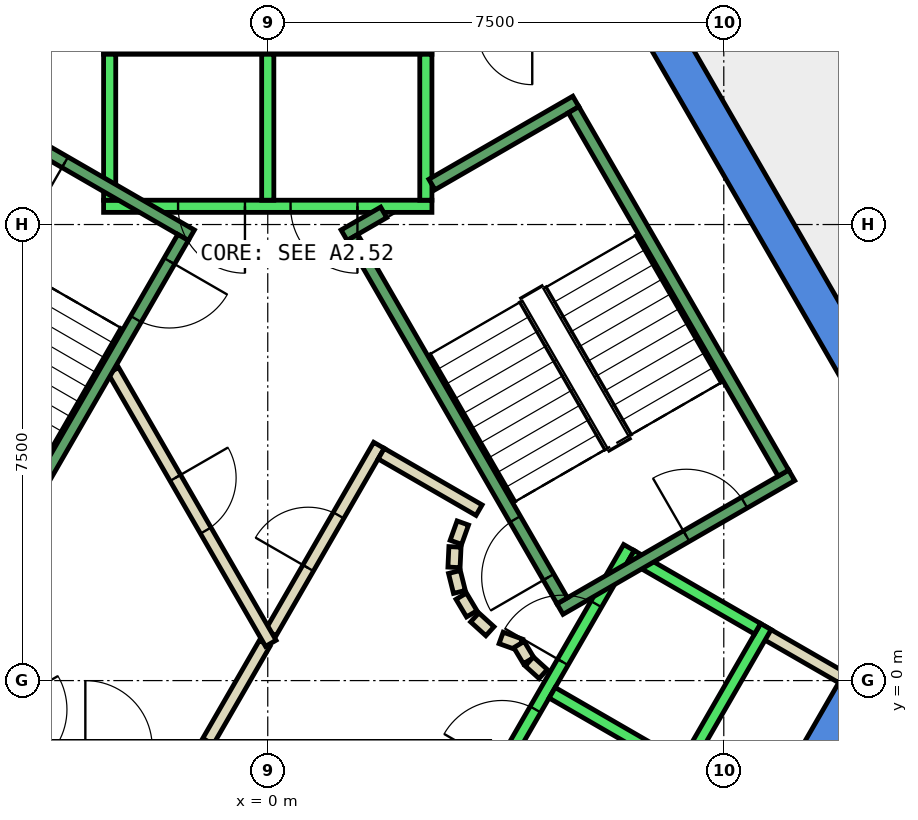
"""IFC4 building model, lengths in metres.
Left out: names, types, materials, properties, quantities, classifications, styles, units other than length and angle.
Written with IfcOpenShell. Run it as: python <this file> out.ifc"""

import sys

from ifc_helpers import new_model, si_unit, direction, frame, frame_2d, origin, place, context, subcontext, project, spatial, polyline, rectangle, outline, extrude, element, fill, save


model = new_model("IFC4")
c1 = context("Model", 3, precision=1e-05, world=origin(), true_north=direction((0.0, 1.0)))
c2 = subcontext(c1, "Body", "Model", "MODEL_VIEW")
j1 = project(units=[si_unit("LENGTHUNIT", "METRE"), si_unit("PLANEANGLEUNIT", "RADIAN")], contexts=[c1])
p1 = place(None, origin())
s1 = spatial("IfcSite", under=j1, at=p1, CompositionType="ELEMENT")
p2 = place(p1, origin())
s2 = spatial("IfcBuilding", under=s1, at=p2, CompositionType="ELEMENT")
p3 = place(p2, frame((0.0, 0.0, 252.2)))
s3 = spatial("IfcBuildingStorey", under=s2, at=p3, CompositionType="ELEMENT", Elevation=252.2)
p4 = place(p3, frame((0.0, 0.0, -0.34)))
e1 = element("IfcWall", 1, at=p4, inside=s3, PredefinedType="SHEAR", context=c2, shape_type="SweptSolid", body=[
    extrude(outline(polyline([(6.786, 10.747), (6.266, 10.447), (10.854, 2.5), (11.547, 2.5), (6.786, 10.747)])), origin(), (0.0, 0.0, 1.0), 3.6),
])
p5 = place(p3, frame((0.0, 0.0, -0.34)))
e2 = element("IfcWall", 2, at=p5, inside=s3, PredefinedType="SHEAR", context=c2, shape_type="SweptSolid", body=[
    extrude(outline(polyline([(5.774, -7.5), (11.547, 2.5), (10.854, 2.5), (5.427, -6.9), (5.774, -7.5)])), origin(), (0.0, 0.0, 1.0), 3.6),
])
p6 = place(p3, frame((8.181, 13.532, 0.0), z_axis=(0.0, 0.0, 1.0), x_axis=(0.51625987265, -0.856431984393, 0.0)))
e3 = element("IfcWall", 3, at=p6, inside=s3, PredefinedType="PARTITIONING", context=c2, shape_type="SweptSolid", body=[
    extrude(rectangle(XDim=4.312, YDim=0.2, at=frame_2d((2.156, 0.0))), origin(), (0.0, 0.0, 1.0), 3.26),
])
p7 = place(p6, frame((1.706, 0.0, 0.0)))
e4 = element("IfcOpeningElement", 4, at=p7, cuts=e3, PredefinedType="OPENING", context=c2, shape_type="SweptSolid", body=[
    extrude(rectangle(XDim=1.0, YDim=2.1, at=frame_2d((0.5, 1.05))), frame((0.0, 0.11, 0.0), z_axis=(0.0, -1.0, 0.0), x_axis=(1.0, 0.0, 0.0)), (0.0, 0.0, 1.0), 0.22),
])
p8 = place(p3, frame((8.141, 0.801, 0.0), z_axis=(0.0, 0.0, 1.0), x_axis=(0.866434738017, -0.499290341141, 0.0)))
e5 = element("IfcWall", 5, at=p8, inside=s3, PredefinedType="PARTITIONING", context=c2, shape_type="SweptSolid", body=[
    extrude(rectangle(XDim=1.5, YDim=0.2, at=frame_2d((0.75, 0.0))), origin(), (0.0, 0.0, 1.0), 3.26),
])
p9 = place(p3, frame((9.285, -4.818, 0.0), z_axis=(0.0, 0.0, 1.0), x_axis=(0.499962569651, 0.866047013128, 0.0)))
e6 = element("IfcWall", 6, at=p9, inside=s3, PredefinedType="PARTITIONING", context=c2, shape_type="SweptSolid", body=[
    extrude(rectangle(XDim=7.334, YDim=0.2, at=frame_2d((3.667, 0.0))), origin(), (0.0, 0.0, 1.0), 3.26),
])
p10 = place(p3, frame((-0.982, -1.0, 0.0), z_axis=(0.0, 0.0, 1.0), x_axis=(0.50024047865, 0.865886518847, 0.0)))
e7 = element("IfcWall", 7, at=p10, inside=s3, PredefinedType="PARTITIONING", context=c2, shape_type="SweptSolid", body=[
    extrude(rectangle(XDim=1.863, YDim=0.2, at=frame_2d((0.931, 0.0))), origin(), (0.0, 0.0, 1.0), 3.26),
])
p11 = place(p3, frame((0.05, 0.787, 0.0), z_axis=(0.0, 0.0, 1.0), x_axis=(0.499954076797, 0.866051915934, 0.0)))
e8 = element("IfcWall", 8, at=p11, inside=s3, PredefinedType="PARTITIONING", context=c2, shape_type="SweptSolid", body=[
    extrude(rectangle(XDim=3.558, YDim=0.2, at=frame_2d((1.779, 0.0))), origin(), (0.0, 0.0, 1.0), 3.26),
])
p12 = place(p11, frame((1.229, 0.0, 0.0)))
e9 = element("IfcOpeningElement", 9, at=p12, cuts=e8, PredefinedType="OPENING", context=c2, shape_type="SweptSolid", body=[
    extrude(rectangle(XDim=1.0, YDim=2.1, at=frame_2d((0.5, 1.05))), frame((0.0, 0.11, 0.0), z_axis=(0.0, -1.0, 0.0), x_axis=(1.0, 0.0, 0.0)), (0.0, 0.0, 1.0), 0.22),
])
p13 = place(p3, frame((1.866, 3.732, 0.0), z_axis=(0.0, 0.0, 1.0), x_axis=(0.866043361281, -0.499968895414, 0.0)))
e10 = element("IfcWall", 10, at=p13, inside=s3, PredefinedType="PARTITIONING", context=c2, shape_type="SweptSolid", body=[
    extrude(rectangle(XDim=1.858, YDim=0.2, at=frame_2d((0.929, 0.0))), origin(), (0.0, 0.0, 1.0), 3.26),
])
p14 = place(p3, frame((3.208, 2.592, 0.0), z_axis=(0.0, 0.0, 1.0), x_axis=(-0.337388820924, -0.941365382578, 0.0)))
e11 = element("IfcWall", 11, at=p14, inside=s3, PredefinedType="PARTITIONING", context=c2, shape_type="SweptSolid", body=[
    extrude(rectangle(XDim=0.338, YDim=0.2, at=frame_2d((0.169, 0.0))), origin(), (0.0, 0.0, 1.0), 3.26),
])
p15 = place(p3, frame((3.079, 2.199, 0.0), z_axis=(0.0, 0.0, 1.0), x_axis=(-0.047771483479, -0.998858290933, 0.0)))
e12 = element("IfcWall", 12, at=p15, inside=s3, PredefinedType="PARTITIONING", context=c2, shape_type="SweptSolid", body=[
    extrude(rectangle(XDim=0.337, YDim=0.2, at=frame_2d((0.169, 0.0))), origin(), (0.0, 0.0, 1.0), 3.26),
])
p16 = place(p3, frame((3.07, 1.786, 0.0), z_axis=(0.0, 0.0, 1.0), x_axis=(0.242705583207, -0.970099994784, 0.0)))
e13 = element("IfcWall", 13, at=p16, inside=s3, PredefinedType="PARTITIONING", context=c2, shape_type="SweptSolid", body=[
    extrude(rectangle(XDim=0.338, YDim=0.2, at=frame_2d((0.169, 0.0))), origin(), (0.0, 0.0, 1.0), 3.26),
])
for number, where, z_axis, x_axis in (
    (14, (3.182, 1.388, 0.0), (0.0, 0.0, 1.0), (0.512, -0.859, 0.0)),
    (15, (3.404, 1.039, 0.0), (0.0, 0.0, 1.0), (0.74, -0.672, 0.0)),
):
    element("IfcWall", number, at=place(p3, frame(where, z_axis=z_axis, x_axis=x_axis)), inside=s3, PredefinedType="PARTITIONING", context=c2, shape_type="SweptSolid", body=[
        extrude(rectangle(XDim=0.338, YDim=0.2, at=frame_2d((0.169, 0.0))), origin(), (0.0, 0.0, 1.0), 3.26),
    ])
p17 = place(p3, frame((3.838, 0.702, 0.0), z_axis=(0.0, 0.0, 1.0), x_axis=(0.941035081519, -0.338308993895, 0.0)))
e16 = element("IfcWall", 16, at=p17, inside=s3, PredefinedType="PARTITIONING", context=c2, shape_type="SweptSolid", body=[
    extrude(rectangle(XDim=0.337, YDim=0.2, at=frame_2d((0.168, 0.0))), origin(), (0.0, 0.0, 1.0), 3.26),
])
p18 = place(p3, frame((4.132, 0.593, 0.0), z_axis=(0.0, 0.0, 1.0), x_axis=(0.513561617048, -0.858052717201, 0.0)))
e17 = element("IfcWall", 17, at=p18, inside=s3, PredefinedType="PARTITIONING", context=c2, shape_type="SweptSolid", body=[
    extrude(rectangle(XDim=0.308, YDim=0.2, at=frame_2d((0.154, 0.0))), origin(), (0.0, 0.0, 1.0), 3.26),
])
p19 = place(p3, frame((4.301, 0.315, 0.0), z_axis=(0.0, 0.0, 1.0), x_axis=(0.741798017506, -0.670623367639, 0.0)))
e18 = element("IfcWall", 18, at=p19, inside=s3, PredefinedType="PARTITIONING", context=c2, shape_type="SweptSolid", body=[
    extrude(rectangle(XDim=0.309, YDim=0.2, at=frame_2d((0.154, 0.0))), origin(), (0.0, 0.0, 1.0), 3.26),
])
p20 = place(p3, frame((-2.54, 5.1, 0.0), z_axis=(0.0, 0.0, 1.0), x_axis=(0.499925051871, -0.866068670783, 0.0)))
e19 = element("IfcWall", 19, at=p20, inside=s3, PredefinedType="PARTITIONING", context=c2, shape_type="SweptSolid", body=[
    extrude(rectangle(XDim=5.181, YDim=0.2, at=frame_2d((2.59, 0.0))), origin(), (0.0, 0.0, 1.0), 3.26),
])
p21 = place(p20, frame((2.04, 0.0, 0.0)))
e20 = element("IfcOpeningElement", 20, at=p21, cuts=e19, PredefinedType="OPENING", context=c2, shape_type="SweptSolid", body=[
    extrude(rectangle(XDim=1.0, YDim=2.1, at=frame_2d((0.5, 1.05))), frame((0.0, 0.11, 0.0), z_axis=(0.0, -1.0, 0.0), x_axis=(1.0, 0.0, 0.0)), (0.0, 0.0, 1.0), 0.22),
])
p22 = place(p3, frame((2.7, 7.8, 0.0), z_axis=(0.0, 0.0, 1.0), x_axis=(-1.0, 0.0, 0.0)))
e21 = element("IfcWall", 21, at=p22, inside=s3, PredefinedType="STANDARD", context=c2, shape_type="SweptSolid", body=[
    extrude(rectangle(XDim=5.4, YDim=0.2, at=frame_2d((2.7, 0.0))), origin(), (0.0, 0.0, 1.0), 3.26),
])
p23 = place(p22, frame((1.225, 0.0, 0.0)))
e22 = element("IfcOpeningElement", 22, at=p23, cuts=e21, PredefinedType="OPENING", context=c2, shape_type="SweptSolid", body=[
    extrude(rectangle(XDim=1.1, YDim=2.1, at=frame_2d((0.55, 1.05))), frame((0.0, 0.11, 0.0), z_axis=(0.0, -1.0, 0.0), x_axis=(1.0, 0.0, 0.0)), (0.0, 0.0, 1.0), 0.22),
])
p24 = place(p22, frame((3.075, 0.0, 0.0)))
e23 = element("IfcOpeningElement", 23, at=p24, cuts=e21, PredefinedType="OPENING", context=c2, shape_type="SweptSolid", body=[
    extrude(rectangle(XDim=1.1, YDim=2.1, at=frame_2d((0.55, 1.05))), frame((0.0, 0.11, 0.0), z_axis=(0.0, -1.0, 0.0), x_axis=(1.0, 0.0, 0.0)), (0.0, 0.0, 1.0), 0.22),
])
p25 = place(p3, frame((2.7, 10.4, 0.0), z_axis=(0.0, 0.0, 1.0), x_axis=(-1.0, 0.0, 0.0)))
e24 = element("IfcWall", 24, at=p25, inside=s3, PredefinedType="STANDARD", context=c2, shape_type="SweptSolid", body=[
    extrude(rectangle(XDim=5.4, YDim=0.2, at=frame_2d((2.7, 0.0))), origin(), (0.0, 0.0, 1.0), 3.26),
])
for number, where, z_axis, x_axis in (
    (25, (2.6, 7.9, 0.0), (0.0, 0.0, 1.0), (0.0, 1.0, 0.0)),
    (26, (0.0, 7.9, 0.0), (0.0, 0.0, 1.0), (0.0, 1.0, 0.0)),
    (27, (-2.6, 7.9, 0.0), (0.0, 0.0, 1.0), (0.0, 1.0, 0.0)),
):
    element("IfcWall", number, at=place(p3, frame(where, z_axis=z_axis, x_axis=x_axis)), inside=s3, PredefinedType="STANDARD", context=c2, shape_type="SweptSolid", body=[
        extrude(rectangle(XDim=2.4, YDim=0.2, at=frame_2d((1.2, 0.0))), origin(), (0.0, 0.0, 1.0), 3.26),
    ])
p26 = place(p3, frame((-5.94, 2.188, 0.0), z_axis=(0.0, 0.0, 1.0), x_axis=(0.500034260056, -0.866005622828, 0.0)))
e28 = element("IfcWall", 28, at=p26, inside=s3, PredefinedType="STANDARD", context=c2, shape_type="SweptSolid", body=[
    extrude(rectangle(XDim=5.399, YDim=0.2, at=frame_2d((2.7, 0.0))), origin(), (0.0, 0.0, 1.0), 3.26),
])
p27 = place(p26, frame((3.075, 0.0, 0.0)))
e29 = element("IfcOpeningElement", 29, at=p27, cuts=e28, PredefinedType="OPENING", context=c2, shape_type="SweptSolid", body=[
    extrude(rectangle(XDim=1.1, YDim=2.1, at=frame_2d((0.55, 1.05))), frame((0.0, 0.11, 0.0), z_axis=(0.0, -1.0, 0.0), x_axis=(1.0, 0.0, 0.0)), (0.0, 0.0, 1.0), 0.22),
])
p28 = place(p26, frame((1.225, 0.0, 0.0)))
e30 = element("IfcOpeningElement", 30, at=p28, cuts=e28, PredefinedType="OPENING", context=c2, shape_type="SweptSolid", body=[
    extrude(rectangle(XDim=1.1, YDim=2.1, at=frame_2d((0.55, 1.05))), frame((0.0, 0.11, 0.0), z_axis=(0.0, -1.0, 0.0), x_axis=(1.0, 0.0, 0.0)), (0.0, 0.0, 1.0), 0.22),
])
p29 = place(p3, frame((3.24, -2.488, 0.0), z_axis=(0.0, 0.0, 1.0), x_axis=(0.500034260056, 0.866005622828, 0.0)))
e31 = element("IfcWall", 31, at=p29, inside=s3, PredefinedType="STANDARD", context=c2, shape_type="SweptSolid", body=[
    extrude(rectangle(XDim=5.399, YDim=0.2, at=frame_2d((2.7, 0.0))), origin(), (0.0, 0.0, 1.0), 3.26),
])
p30 = place(p29, frame((3.225, 0.0, 0.0)))
e32 = element("IfcOpeningElement", 32, at=p30, cuts=e31, PredefinedType="OPENING", context=c2, shape_type="SweptSolid", body=[
    extrude(rectangle(XDim=1.1, YDim=2.1, at=frame_2d((0.55, 1.05))), frame((0.0, 0.11, 0.0), z_axis=(0.0, -1.0, 0.0), x_axis=(1.0, 0.0, 0.0)), (0.0, 0.0, 1.0), 0.22),
])
p31 = place(p29, frame((1.225, 0.0, 0.0)))
e33 = element("IfcOpeningElement", 33, at=p31, cuts=e31, PredefinedType="OPENING", context=c2, shape_type="SweptSolid", body=[
    extrude(rectangle(XDim=1.1, YDim=2.1, at=frame_2d((0.55, 1.05))), frame((0.0, 0.11, 0.0), z_axis=(0.0, -1.0, 0.0), x_axis=(1.0, 0.0, 0.0)), (0.0, 0.0, 1.0), 0.22),
])
p32 = place(p3, frame((5.492, -3.788, 0.0), z_axis=(0.0, 0.0, 1.0), x_axis=(0.500034260056, 0.866005622828, 0.0)))
e34 = element("IfcWall", 34, at=p32, inside=s3, PredefinedType="STANDARD", context=c2, shape_type="SweptSolid", body=[
    extrude(rectangle(XDim=5.399, YDim=0.2, at=frame_2d((2.7, 0.0))), origin(), (0.0, 0.0, 1.0), 3.26),
])
for number, where, z_axis, x_axis in (
    (35, (4.677, -0.2, 0.0), (0.0, 0.0, 1.0), (0.866, -0.5, 0.0)),
    (36, (5.977, 2.052, 0.0), (0.0, 0.0, 1.0), (0.866, -0.5, 0.0)),
):
    element("IfcWall", number, at=place(p3, frame(where, z_axis=z_axis, x_axis=x_axis)), inside=s3, PredefinedType="STANDARD", context=c2, shape_type="SweptSolid", body=[
        extrude(rectangle(XDim=2.399, YDim=0.2, at=frame_2d((1.2, 0.0))), origin(), (0.0, 0.0, 1.0), 3.26),
    ])
p33 = place(p3, frame((4.806, 1.176, 0.0), z_axis=(0.0, 0.0, 1.0), x_axis=(0.866059941101, 0.499940174841, 0.0)))
e37 = element("IfcWall", 37, at=p33, inside=s3, PredefinedType="STANDARD", context=c2, shape_type="SweptSolid", body=[
    extrude(rectangle(XDim=4.4, YDim=0.2, at=frame_2d((2.2, 0.0))), origin(), (0.0, 0.0, 1.0), 3.26),
])
p34 = place(p33, frame((2.4, 0.0, 0.0)))
e38 = element("IfcOpeningElement", 38, at=p34, cuts=e37, PredefinedType="OPENING", context=c2, shape_type="SweptSolid", body=[
    extrude(rectangle(XDim=1.1, YDim=2.2, at=frame_2d((0.55, 1.1))), frame((0.0, 0.11, 0.0), z_axis=(0.0, -1.0, 0.0), x_axis=(1.0, 0.0, 0.0)), (0.0, 0.0, 1.0), 0.22),
])
p35 = place(p3, frame((2.7, 8.158, 0.0), z_axis=(0.0, 0.0, 1.0), x_axis=(0.86611865017, 0.499838457731, 0.0)))
e39 = element("IfcWall", 39, at=p35, inside=s3, PredefinedType="STANDARD", context=c2, shape_type="SweptSolid", body=[
    extrude(rectangle(XDim=2.733, YDim=0.2, at=frame_2d((1.366, 0.0))), origin(), (0.0, 0.0, 1.0), 3.26),
])
p36 = place(p3, frame((1.256, 7.324, 0.0), z_axis=(0.0, 0.0, 1.0), x_axis=(0.865915093549, 0.500191014278, 0.0)))
e40 = element("IfcWall", 40, at=p36, inside=s3, PredefinedType="STANDARD", context=c2, shape_type="SweptSolid", body=[
    extrude(rectangle(XDim=0.752, YDim=0.2, at=frame_2d((0.376, 0.0))), origin(), (0.0, 0.0, 1.0), 3.26),
])
p37 = place(p3, frame((4.843, 1.312, 0.0), z_axis=(0.0, 0.0, 1.0), x_axis=(-0.499963383562, 0.866046543262, 0.0)))
e41 = element("IfcWall", 41, at=p37, inside=s3, PredefinedType="STANDARD", context=c2, shape_type="SweptSolid", body=[
    extrude(rectangle(XDim=6.9, YDim=0.2, at=frame_2d((3.45, 0.0))), origin(), (0.0, 0.0, 1.0), 3.26),
])
p38 = place(p37, frame((0.45, 0.0, 0.0)))
e42 = element("IfcOpeningElement", 42, at=p38, cuts=e41, PredefinedType="OPENING", context=c2, shape_type="SweptSolid", body=[
    extrude(rectangle(XDim=1.1, YDim=2.2, at=frame_2d((0.55, 1.1))), frame((0.0, 0.11, 0.0), z_axis=(0.0, -1.0, 0.0), x_axis=(1.0, 0.0, 0.0)), (0.0, 0.0, 1.0), 0.22),
])
p39 = place(p3, frame((8.48, 3.412, 0.0), z_axis=(0.0, 0.0, 1.0), x_axis=(-0.499978703459, 0.866037698999, 0.0)))
e43 = element("IfcWall", 43, at=p39, inside=s3, PredefinedType="STANDARD", context=c2, shape_type="SweptSolid", body=[
    extrude(rectangle(XDim=6.9, YDim=0.2, at=frame_2d((3.45, 0.0))), origin(), (0.0, 0.0, 1.0), 3.26),
])
p40 = place(p3, frame((-1.256, 7.324, 0.0), z_axis=(0.0, 0.0, 1.0), x_axis=(-0.866046073146, 0.499964197906, 0.0)))
e44 = element("IfcWall", 44, at=p40, inside=s3, PredefinedType="STANDARD", context=c2, shape_type="SweptSolid", body=[
    extrude(rectangle(XDim=4.4, YDim=0.2, at=frame_2d((2.2, 0.0))), origin(), (0.0, 0.0, 1.0), 3.26),
])
p41 = place(p40, frame((2.4, 0.0, 0.0)))
e45 = element("IfcOpeningElement", 45, at=p41, cuts=e44, PredefinedType="OPENING", context=c2, shape_type="SweptSolid", body=[
    extrude(rectangle(XDim=1.1, YDim=2.2, at=frame_2d((0.55, 1.1))), frame((0.0, 0.11, 0.0), z_axis=(0.0, -1.0, 0.0), x_axis=(1.0, 0.0, 0.0)), (0.0, 0.0, 1.0), 0.22),
])
p42 = place(p3, frame((-1.393, 7.288, 0.0), z_axis=(0.0, 0.0, 1.0), x_axis=(-0.499963383562, -0.866046543262, 0.0)))
e46 = element("IfcWall", 46, at=p42, inside=s3, PredefinedType="STANDARD", context=c2, shape_type="SweptSolid", body=[
    extrude(rectangle(XDim=6.9, YDim=0.2, at=frame_2d((3.45, 0.0))), origin(), (0.0, 0.0, 1.0), 3.26),
])
p43 = place(p42, frame((0.45, 0.0, 0.0)))
e47 = element("IfcOpeningElement", 47, at=p43, cuts=e46, PredefinedType="OPENING", context=c2, shape_type="SweptSolid", body=[
    extrude(rectangle(XDim=1.1, YDim=2.2, at=frame_2d((0.55, 1.1))), frame((0.0, 0.11, 0.0), z_axis=(0.0, -1.0, 0.0), x_axis=(1.0, 0.0, 0.0)), (0.0, 0.0, 1.0), 0.22),
])
p44 = place(p12, origin())
e48 = element("IfcDoor", 48, at=p44, inside=s3, OperationType="SINGLE_SWING_RIGHT", PredefinedType="DOOR", context=c2, shape_type="SweptSolid", body=[
    extrude(rectangle(XDim=1.0, YDim=2.1, at=frame_2d((0.5, 1.05))), frame((0.0, 0.025, 0.0), z_axis=(0.0, -1.0, 0.0), x_axis=(1.0, 0.0, 0.0)), (0.0, 0.0, 1.0), 0.05),
])
fill(e9, e48)
p45 = place(p21, origin())
e49 = element("IfcDoor", 49, at=p45, inside=s3, OperationType="SINGLE_SWING_RIGHT", PredefinedType="DOOR", context=c2, shape_type="SweptSolid", body=[
    extrude(rectangle(XDim=1.0, YDim=2.1, at=frame_2d((0.5, 1.05))), frame((0.0, 0.025, 0.0), z_axis=(0.0, -1.0, 0.0), x_axis=(1.0, 0.0, 0.0)), (0.0, 0.0, 1.0), 0.05),
])
fill(e20, e49)
p46 = place(p23, origin())
e50 = element("IfcDoor", 50, at=p46, inside=s3, OperationType="SLIDING_TO_LEFT", PredefinedType="DOOR", context=c2, shape_type="SweptSolid", body=[
    extrude(rectangle(XDim=1.1, YDim=2.1, at=frame_2d((0.55, 1.05))), frame((0.0, 0.025, 0.0), z_axis=(0.0, -1.0, 0.0), x_axis=(1.0, 0.0, 0.0)), (0.0, 0.0, 1.0), 0.05),
])
fill(e22, e50)
p47 = place(p24, origin())
e51 = element("IfcDoor", 51, at=p47, inside=s3, OperationType="SLIDING_TO_LEFT", PredefinedType="DOOR", context=c2, shape_type="SweptSolid", body=[
    extrude(rectangle(XDim=1.1, YDim=2.1, at=frame_2d((0.55, 1.05))), frame((0.0, 0.025, 0.0), z_axis=(0.0, -1.0, 0.0), x_axis=(1.0, 0.0, 0.0)), (0.0, 0.0, 1.0), 0.05),
])
fill(e23, e51)
p48 = place(p30, origin())
e52 = element("IfcDoor", 52, at=p48, inside=s3, OperationType="SLIDING_TO_LEFT", PredefinedType="DOOR", context=c2, shape_type="SweptSolid", body=[
    extrude(rectangle(XDim=1.1, YDim=2.1, at=frame_2d((0.55, 1.05))), frame((0.0, 0.025, 0.0), z_axis=(0.0, -1.0, 0.0), x_axis=(1.0, 0.0, 0.0)), (0.0, 0.0, 1.0), 0.05),
])
fill(e32, e52)
p49 = place(p31, origin())
e53 = element("IfcDoor", 53, at=p49, inside=s3, OperationType="SLIDING_TO_LEFT", PredefinedType="DOOR", context=c2, shape_type="SweptSolid", body=[
    extrude(rectangle(XDim=1.1, YDim=2.1, at=frame_2d((0.55, 1.05))), frame((0.0, 0.025, 0.0), z_axis=(0.0, -1.0, 0.0), x_axis=(1.0, 0.0, 0.0)), (0.0, 0.0, 1.0), 0.05),
])
fill(e33, e53)
p50 = place(p38, origin())
e54 = element("IfcDoor", 54, at=p50, inside=s3, OperationType="SINGLE_SWING_LEFT", PredefinedType="DOOR", context=c2, shape_type="SweptSolid", body=[
    extrude(rectangle(XDim=1.1, YDim=2.2, at=frame_2d((0.55, 1.1))), frame((0.0, 0.025, 0.0), z_axis=(0.0, -1.0, 0.0), x_axis=(1.0, 0.0, 0.0)), (0.0, 0.0, 1.0), 0.05),
])
fill(e42, e54)
p51 = place(p34, origin())
e55 = element("IfcDoor", 55, at=p51, inside=s3, OperationType="SINGLE_SWING_LEFT", PredefinedType="DOOR", context=c2, shape_type="SweptSolid", body=[
    extrude(rectangle(XDim=1.1, YDim=2.2, at=frame_2d((0.55, 1.1))), frame((0.0, 0.025, 0.0), z_axis=(0.0, -1.0, 0.0), x_axis=(1.0, 0.0, 0.0)), (0.0, 0.0, 1.0), 0.05),
])
fill(e38, e55)
p52 = place(p43, origin())
e56 = element("IfcDoor", 56, at=p52, inside=s3, OperationType="SINGLE_SWING_LEFT", PredefinedType="DOOR", context=c2, shape_type="SweptSolid", body=[
    extrude(rectangle(XDim=1.1, YDim=2.2, at=frame_2d((0.55, 1.1))), frame((0.0, 0.025, 0.0), z_axis=(0.0, -1.0, 0.0), x_axis=(1.0, 0.0, 0.0)), (0.0, 0.0, 1.0), 0.05),
])
fill(e47, e56)
p53 = place(p41, origin())
e57 = element("IfcDoor", 57, at=p53, inside=s3, OperationType="SINGLE_SWING_LEFT", PredefinedType="DOOR", context=c2, shape_type="SweptSolid", body=[
    extrude(rectangle(XDim=1.1, YDim=2.2, at=frame_2d((0.55, 1.1))), frame((0.0, 0.025, 0.0), z_axis=(0.0, -1.0, 0.0), x_axis=(1.0, 0.0, 0.0)), (0.0, 0.0, 1.0), 0.05),
])
fill(e45, e57)
save(model, sys.argv[1])
